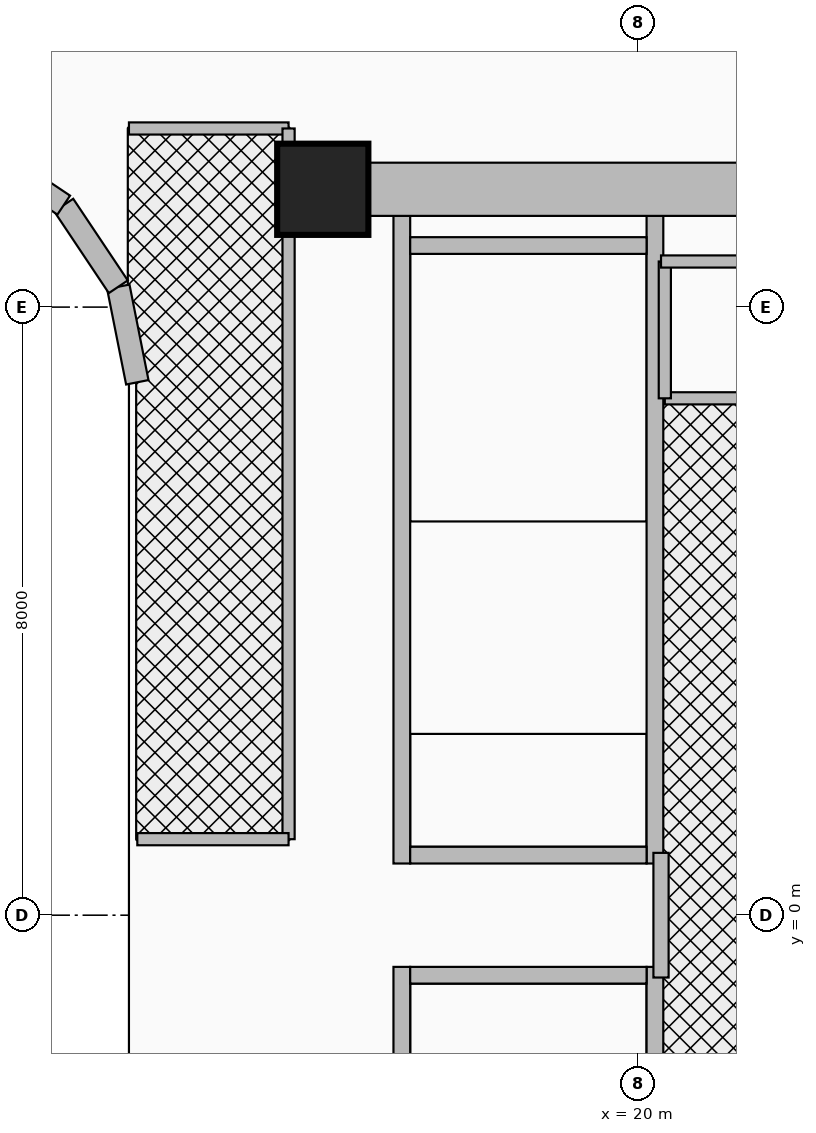
"""IFC4 building model, lengths in metres.
Left out: names, types, materials, properties, quantities, classifications, styles, units other than length and angle.
Written with IfcOpenShell. Run it as: python <this file> out.ifc"""

import sys

from ifc_helpers import new_model, si_unit, direction, frame, frame_2d, origin, origin_2d, place, context, subcontext, project, spatial, rectangle, extrude, source, transform, mapped, element, fill, save


model = new_model("IFC4")
c1 = context("Model", 3, precision=1e-05, world=origin(), true_north=direction((0.0, 1.0)))
c2 = subcontext(c1, "Body", "Model", "MODEL_VIEW")
j1 = project(units=[si_unit("LENGTHUNIT", "METRE"), si_unit("PLANEANGLEUNIT", "RADIAN")], contexts=[c1])
p1 = place(None, origin())
s1 = spatial("IfcSite", under=j1, at=p1, CompositionType="ELEMENT")
p2 = place(p1, origin())
s2 = spatial("IfcBuilding", under=s1, at=p2, CompositionType="ELEMENT")
p3 = place(p2, frame((0.0, 0.0, 131.6)))
s3 = spatial("IfcBuildingStorey", under=s2, at=p3, CompositionType="ELEMENT", Elevation=131.6)
for number, where, z_axis, x_axis in (
    (1, (16.89, 0.68, 0.0), (0.0, 0.0, 1.0), (0.0, 1.0, 0.0)),
    (2, (20.22, 0.68, 0.0), (0.0, 0.0, 1.0), (0.0, 1.0, 0.0)),
):
    element("IfcWall", number, at=place(p3, frame(where, z_axis=z_axis, x_axis=x_axis)), inside=s3, PredefinedType="SHEAR", context=c2, shape_type="SweptSolid", body=[
        extrude(rectangle(XDim=8.52, YDim=0.22, at=frame_2d((4.26, 0.0))), origin(), (0.0, 0.0, 1.0), 3.46),
    ])
p4 = place(p3, frame((17.0, 0.79, 0.0), z_axis=(0.0, 0.0, 1.0), x_axis=(1.0, 0.0, 0.0)))
e3 = element("IfcWall", 3, at=p4, inside=s3, PredefinedType="SHEAR", context=c2, shape_type="SweptSolid", body=[
    extrude(rectangle(XDim=3.11, YDim=0.22, at=frame_2d((1.555, 0.0))), origin(), (0.0, 0.0, 1.0), 3.46),
])
p5 = place(p4, frame((0.95, 0.0, 0.0)))
e4 = element("IfcOpeningElement", 4, at=p5, cuts=e3, PredefinedType="OPENING", context=c2, shape_type="SweptSolid", body=[
    extrude(rectangle(XDim=1.1, YDim=2.15, at=frame_2d((0.55, 1.075))), frame((0.0, 0.125, 0.0), z_axis=(0.0, -1.0, 0.0), x_axis=(1.0, 0.0, 0.0)), (0.0, 0.0, 1.0), 0.25),
])
p6 = place(p3, frame((17.0, 8.81, 0.0), z_axis=(0.0, 0.0, 1.0), x_axis=(1.0, 0.0, 0.0)))
e5 = element("IfcWall", 5, at=p6, inside=s3, PredefinedType="SHEAR", context=c2, shape_type="SweptSolid", body=[
    extrude(rectangle(XDim=3.11, YDim=0.22, at=frame_2d((1.555, 0.0))), origin(), (0.0, 0.0, 1.0), 3.46),
])
for number, where, z_axis, x_axis in (
    (6, (16.89, -9.2, 0.0), (0.0, 0.0, 1.0), (0.0, 1.0, 0.0)),
    (7, (20.22, -9.2, 0.0), (0.0, 0.0, 1.0), (0.0, 1.0, 0.0)),
):
    element("IfcWall", number, at=place(p3, frame(where, z_axis=z_axis, x_axis=x_axis)), inside=s3, PredefinedType="SHEAR", context=c2, shape_type="SweptSolid", body=[
        extrude(rectangle(XDim=8.52, YDim=0.22, at=frame_2d((4.26, 0.0))), origin(), (0.0, 0.0, 1.0), 3.46),
    ])
p7 = place(p3, frame((17.0, -0.79, 0.0), z_axis=(0.0, 0.0, 1.0), x_axis=(1.0, 0.0, 0.0)))
e8 = element("IfcWall", 8, at=p7, inside=s3, PredefinedType="SHEAR", context=c2, shape_type="SweptSolid", body=[
    extrude(rectangle(XDim=3.11, YDim=0.22, at=frame_2d((1.555, 0.0))), origin(), (0.0, 0.0, 1.0), 3.46),
])
p8 = place(p7, frame((0.95, 0.0, 0.0)))
e9 = element("IfcOpeningElement", 9, at=p8, cuts=e8, PredefinedType="OPENING", context=c2, shape_type="SweptSolid", body=[
    extrude(rectangle(XDim=1.1, YDim=2.15, at=frame_2d((0.55, 1.075))), frame((0.0, 0.125, 0.0), z_axis=(0.0, -1.0, 0.0), x_axis=(1.0, 0.0, 0.0)), (0.0, 0.0, 1.0), 0.25),
])
p9 = place(p3, frame((15.85, 9.55, 0.0), z_axis=(0.0, 0.0, 1.0), x_axis=(1.0, 0.0, 0.0)))
e10 = element("IfcWall", 10, at=p9, inside=s3, PredefinedType="SHEAR", context=c2, shape_type="SweptSolid", body=[
    extrude(rectangle(XDim=9.0, YDim=0.7, at=frame_2d((4.5, 0.0))), origin(), (0.0, 0.0, 1.0), 3.46),
])
m1 = source(origin(), c2, "Body", "SweptSolid", [
    extrude(rectangle(XDim=1.2, YDim=1.2, at=origin_2d()), origin(), (0.0, 0.0, 1.0), 3.7),
])
p10 = place(p3, frame((15.85, 9.55, 0.0), z_axis=(0.0, 0.0, 1.0), x_axis=(1.0, 0.0, 0.0)))
e11 = element("IfcColumn", 11, at=p10, inside=s3, PredefinedType="COLUMN", context=c2, shape_type="MappedRepresentation", body=[
    mapped(m1, transform((0.0, 0.0, 0.0), x_axis=(1.0, 0.0, 0.0), y_axis=(0.0, 1.0, 0.0), z_axis=(0.0, 0.0, 1.0), scale=1.0)),
])
p11 = place(p3, frame((13.41, 7.011, 0.0), z_axis=(0.0, 0.0, 1.0), x_axis=(-0.195090163074, 0.980785312019, 0.0)))
e12 = element("IfcWall", 12, at=p11, inside=s3, PredefinedType="SOLIDWALL", context=c2, shape_type="SweptSolid", body=[
    extrude(rectangle(XDim=1.281, YDim=0.3, at=frame_2d((0.641, 0.0))), origin(), (0.0, 0.0, 1.0), 3.46),
])
for number, where, z_axis, x_axis in (
    (13, (13.16, 8.268, 0.0), (0.0, 0.0, 1.0), (-0.556, 0.831, 0.0)),
    (14, (12.442, 9.342, 0.0), (0.0, 0.0, 1.0), (-0.831, 0.556, 0.0)),
):
    element("IfcWall", number, at=place(p3, frame(where, z_axis=z_axis, x_axis=x_axis)), inside=s3, PredefinedType="SOLIDWALL", context=c2, shape_type="SweptSolid", body=[
        extrude(rectangle(XDim=1.292, YDim=0.3, at=frame_2d((0.646, 0.0))), origin(), (0.0, 0.0, 1.0), 3.46),
    ])
p12 = place(p3, frame((20.3, -0.82, 0.0), z_axis=(0.0, 0.0, 1.0), x_axis=(0.0, 1.0, 0.0)))
e15 = element("IfcWall", 15, at=p12, inside=s3, PredefinedType="PARTITIONING", context=c2, shape_type="SweptSolid", body=[
    extrude(rectangle(XDim=1.64, YDim=0.2, at=frame_2d((0.82, 0.0))), origin(), (0.0, 0.0, 1.0), 3.46),
])
p13 = place(p12, frame((0.295, 0.0, 0.0)))
e16 = element("IfcOpeningElement", 16, at=p13, cuts=e15, PredefinedType="OPENING", context=c2, shape_type="SweptSolid", body=[
    extrude(rectangle(XDim=1.05, YDim=2.15, at=frame_2d((0.525, 1.075))), frame((0.0, 0.115, 0.0), z_axis=(0.0, -1.0, 0.0), x_axis=(1.0, 0.0, 0.0)), (0.0, 0.0, 1.0), 0.23),
])
p14 = place(p3, frame((20.35, 6.8, 0.0), z_axis=(0.0, 0.0, 1.0), x_axis=(1.0, 0.0, 0.0)))
e17 = element("IfcWall", 17, at=p14, inside=s3, PredefinedType="PARTITIONING", context=c2, shape_type="SweptSolid", body=[
    extrude(rectangle(XDim=1.2, YDim=0.16, at=frame_2d((0.6, 0.0))), origin(), (0.0, 0.0, 1.0), 3.46),
])
p15 = place(p14, frame((0.175, 0.0, 0.0)))
e18 = element("IfcOpeningElement", 18, at=p15, cuts=e17, PredefinedType="OPENING", context=c2, shape_type="SweptSolid", body=[
    extrude(rectangle(XDim=0.85, YDim=2.05, at=frame_2d((0.425, 1.025))), frame((0.0, 0.095, 0.0), z_axis=(0.0, -1.0, 0.0), x_axis=(1.0, 0.0, 0.0)), (0.0, 0.0, 1.0), 0.19),
])
p16 = place(p3, frame((20.35, 6.8, 0.0), z_axis=(0.0, 0.0, 1.0), x_axis=(0.0, 1.0, 0.0)))
e19 = element("IfcWall", 19, at=p16, inside=s3, PredefinedType="PARTITIONING", context=c2, shape_type="SweptSolid", body=[
    extrude(rectangle(XDim=1.8, YDim=0.16, at=frame_2d((0.9, 0.0))), origin(), (0.0, 0.0, 1.0), 3.46),
])
p17 = place(p3, frame((20.3, 8.6, 0.0), z_axis=(0.0, 0.0, 1.0), x_axis=(1.0, 0.0, 0.0)))
e20 = element("IfcWall", 20, at=p17, inside=s3, PredefinedType="PARTITIONING", context=c2, shape_type="SweptSolid", body=[
    extrude(rectangle(XDim=1.82, YDim=0.16, at=frame_2d((0.91, 0.0))), origin(), (0.0, 0.0, 1.0), 3.46),
])
p18 = place(p3, frame((13.3, 10.35, 0.0), z_axis=(0.0, 0.0, 1.0), x_axis=(1.0, 0.0, 0.0)))
e21 = element("IfcWall", 21, at=p18, inside=s3, PredefinedType="PARTITIONING", context=c2, shape_type="SweptSolid", body=[
    extrude(rectangle(XDim=2.1, YDim=0.16, at=frame_2d((1.05, 0.0))), origin(), (0.0, 0.0, 1.0), 2.666),
])
p19 = place(p18, frame((0.45, 0.0, 0.0)))
e22 = element("IfcOpeningElement", 22, at=p19, cuts=e21, PredefinedType="OPENING", context=c2, shape_type="SweptSolid", body=[
    extrude(rectangle(XDim=0.9, YDim=2.1, at=frame_2d((0.45, 1.05))), frame((0.0, 0.095, 0.0), z_axis=(0.0, -1.0, 0.0), x_axis=(1.0, 0.0, 0.0)), (0.0, 0.0, 1.0), 0.19),
])
p20 = place(p3, frame((15.4, 1.0, 0.0), z_axis=(0.0, 0.0, 1.0), x_axis=(0.0, 1.0, 0.0)))
e23 = element("IfcWall", 23, at=p20, inside=s3, PredefinedType="PARTITIONING", context=c2, shape_type="SweptSolid", body=[
    extrude(rectangle(XDim=9.35, YDim=0.16, at=frame_2d((4.675, 0.0))), origin(), (0.0, 0.0, 1.0), 2.245),
])
p21 = place(p3, frame((13.41, 1.0, 0.0), z_axis=(0.0, 0.0, 1.0), x_axis=(1.0, 0.0, 0.0)))
e24 = element("IfcWall", 24, at=p21, inside=s3, PredefinedType="PARTITIONING", context=c2, shape_type="SweptSolid", body=[
    extrude(rectangle(XDim=1.99, YDim=0.16, at=frame_2d((0.995, 0.0))), origin(), (0.0, 0.0, 1.0), 2.245),
])
p22 = place(p13, frame((1.05, 0.0, 0.0), z_axis=(0.0, 0.0, 1.0), x_axis=(-1.0, 0.0, 0.0)))
e25 = element("IfcDoor", 25, at=p22, inside=s3, OperationType="SINGLE_SWING_LEFT", PredefinedType="DOOR", context=c2, shape_type="SweptSolid", body=[
    extrude(rectangle(XDim=1.05, YDim=2.15, at=frame_2d((0.525, 1.075))), frame((0.0, 0.025, 0.0), z_axis=(0.0, -1.0, 0.0), x_axis=(1.0, 0.0, 0.0)), (0.0, 0.0, 1.0), 0.05),
])
fill(e16, e25)
p23 = place(p5, origin())
e26 = element("IfcDoor", 26, at=p23, inside=s3, OperationType="SINGLE_SWING_RIGHT", PredefinedType="DOOR", context=c2, shape_type="SweptSolid", body=[
    extrude(rectangle(XDim=1.1, YDim=2.15, at=frame_2d((0.55, 1.075))), frame((0.0, 0.025, 0.0), z_axis=(0.0, -1.0, 0.0), x_axis=(1.0, 0.0, 0.0)), (0.0, 0.0, 1.0), 0.05),
])
fill(e4, e26)
p24 = place(p8, frame((1.1, 0.0, 0.0), z_axis=(0.0, 0.0, 1.0), x_axis=(-1.0, 0.0, 0.0)))
e27 = element("IfcDoor", 27, at=p24, inside=s3, OperationType="SINGLE_SWING_LEFT", PredefinedType="DOOR", context=c2, shape_type="SweptSolid", body=[
    extrude(rectangle(XDim=1.1, YDim=2.15, at=frame_2d((0.55, 1.075))), frame((0.0, 0.025, 0.0), z_axis=(0.0, -1.0, 0.0), x_axis=(1.0, 0.0, 0.0)), (0.0, 0.0, 1.0), 0.05),
])
fill(e9, e27)
p25 = place(p15, origin())
e28 = element("IfcDoor", 28, at=p25, inside=s3, OperationType="SINGLE_SWING_RIGHT", PredefinedType="DOOR", context=c2, shape_type="SweptSolid", body=[
    extrude(rectangle(XDim=0.85, YDim=2.05, at=frame_2d((0.425, 1.025))), frame((0.0, 0.025, 0.0), z_axis=(0.0, -1.0, 0.0), x_axis=(1.0, 0.0, 0.0)), (0.0, 0.0, 1.0), 0.05),
])
fill(e18, e28)
p26 = place(p19, origin())
e29 = element("IfcDoor", 29, at=p26, inside=s3, OperationType="SINGLE_SWING_RIGHT", PredefinedType="DOOR", context=c2, shape_type="SweptSolid", body=[
    extrude(rectangle(XDim=0.9, YDim=2.1, at=frame_2d((0.45, 1.05))), frame((0.0, 0.025, 0.0), z_axis=(0.0, -1.0, 0.0), x_axis=(1.0, 0.0, 0.0)), (0.0, 0.0, 1.0), 0.05),
])
fill(e22, e29)
save(model, sys.argv[1])
